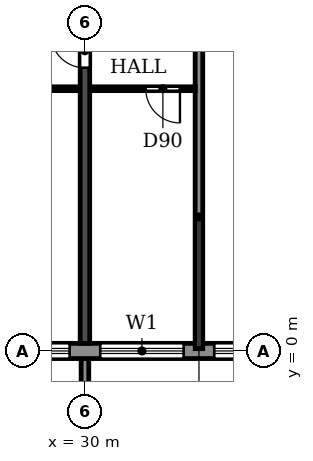
"""IFC4 building model, lengths in metres.
Left out: names, types, materials, properties, quantities, classifications, styles, units other than length and angle.
Written with IfcOpenShell. Run it as: python <this file> out.ifc"""

import sys

from ifc_helpers import new_model, si_unit, direction, frame, frame_2d, origin, place, context, subcontext, project, spatial, polyline, rectangle, outline, extrude, source, transform, mapped, element, fill, save


model = new_model("IFC4")
c1 = context("Model", 3, precision=1e-05, world=origin(), true_north=direction((0.0, 1.0)))
c2 = subcontext(c1, "Body", "Model", "MODEL_VIEW")
j1 = project(units=[si_unit("LENGTHUNIT", "METRE"), si_unit("PLANEANGLEUNIT", "RADIAN")], contexts=[c1])
p1 = place(None, origin())
s1 = spatial("IfcSite", under=j1, at=p1, CompositionType="ELEMENT")
p2 = place(p1, origin())
s2 = spatial("IfcBuilding", under=s1, at=p2, CompositionType="ELEMENT")
p3 = place(p2, frame((0.0, 0.0, 201.6)))
s3 = spatial("IfcBuildingStorey", under=s2, at=p3, CompositionType="ELEMENT", Elevation=201.6)
p4 = place(p3, frame((30.0, 0.2, 0.0), z_axis=(0.0, 0.0, 1.0), x_axis=(0.0, 1.0, 0.0)))
e1 = element("IfcWall", 1, at=p4, inside=s3, PredefinedType="SHEAR", context=c2, shape_type="SweptSolid", body=[
    extrude(rectangle(XDim=11.7, YDim=0.25, at=frame_2d((5.85, 0.0))), origin(), (0.0, 0.0, 1.0), 3.08),
])
p5 = place(p4, frame((7.25, 0.0, 0.0)))
e2 = element("IfcOpeningElement", 2, at=p5, cuts=e1, PredefinedType="OPENING", context=c2, shape_type="SweptSolid", body=[
    extrude(rectangle(XDim=0.9, YDim=2.1, at=frame_2d((0.45, 1.05))), frame((0.0, 0.135, 0.0), z_axis=(0.0, -1.0, 0.0), x_axis=(1.0, 0.0, 0.0)), (0.0, 0.0, 1.0), 0.27),
])
p6 = place(p3, frame((22.683, 0.0, 0.0), z_axis=(0.0, 0.0, 1.0), x_axis=(1.0, 0.0, 0.0)))
e3 = element("IfcWall", 3, at=p6, inside=s3, PredefinedType="STANDARD", context=c2, shape_type="SweptSolid", body=[
    extrude(rectangle(XDim=56.634, YDim=0.4, at=frame_2d((28.317, 0.0))), origin(), (0.0, 0.0, 1.0), 3.08),
])
p7 = place(p6, frame((1.917, 0.0, 0.0)))
e4 = element("IfcOpeningElement", 4, at=p7, cuts=e3, PredefinedType="OPENING", context=c2, shape_type="SweptSolid", body=[
    extrude(rectangle(XDim=1.8, YDim=2.4, at=frame_2d((0.9, 1.2))), frame((0.0, 0.21, 0.0), z_axis=(0.0, -1.0, 0.0), x_axis=(1.0, 0.0, 0.0)), (0.0, 0.0, 1.0), 0.42),
])
p8 = place(p6, frame((4.717, 0.0, 0.9)))
e5 = element("IfcOpeningElement", 5, at=p8, cuts=e3, PredefinedType="OPENING", context=c2, shape_type="SweptSolid", body=[
    extrude(rectangle(XDim=2.2, YDim=1.5, at=frame_2d((1.1, 0.75))), frame((0.0, 0.21, 0.0), z_axis=(0.0, -1.0, 0.0), x_axis=(1.0, 0.0, 0.0)), (0.0, 0.0, 1.0), 0.42),
])
p9 = place(p6, frame((7.717, 0.0, 0.9)))
e6 = element("IfcOpeningElement", 6, at=p9, cuts=e3, PredefinedType="OPENING", context=c2, shape_type="SweptSolid", body=[
    extrude(rectangle(XDim=2.2, YDim=1.5, at=frame_2d((1.1, 0.75))), frame((0.0, 0.21, 0.0), z_axis=(0.0, -1.0, 0.0), x_axis=(1.0, 0.0, 0.0)), (0.0, 0.0, 1.0), 0.42),
])
p10 = place(p6, frame((10.717, 0.0, 0.9)))
e7 = element("IfcOpeningElement", 7, at=p10, cuts=e3, PredefinedType="OPENING", context=c2, shape_type="SweptSolid", body=[
    extrude(rectangle(XDim=2.2, YDim=1.5, at=frame_2d((1.1, 0.75))), frame((0.0, 0.21, 0.0), z_axis=(0.0, -1.0, 0.0), x_axis=(1.0, 0.0, 0.0)), (0.0, 0.0, 1.0), 0.42),
])
p11 = place(p6, frame((13.917, 0.0, 0.0)))
e8 = element("IfcOpeningElement", 8, at=p11, cuts=e3, PredefinedType="OPENING", context=c2, shape_type="SweptSolid", body=[
    extrude(rectangle(XDim=1.8, YDim=2.4, at=frame_2d((0.9, 1.2))), frame((0.0, 0.21, 0.0), z_axis=(0.0, -1.0, 0.0), x_axis=(1.0, 0.0, 0.0)), (0.0, 0.0, 1.0), 0.42),
])
p12 = place(p6, frame((16.717, 0.0, 0.9)))
e9 = element("IfcOpeningElement", 9, at=p12, cuts=e3, PredefinedType="OPENING", context=c2, shape_type="SweptSolid", body=[
    extrude(rectangle(XDim=2.2, YDim=1.5, at=frame_2d((1.1, 0.75))), frame((0.0, 0.21, 0.0), z_axis=(0.0, -1.0, 0.0), x_axis=(1.0, 0.0, 0.0)), (0.0, 0.0, 1.0), 0.42),
])
p13 = place(p6, frame((19.717, 0.0, 0.9)))
e10 = element("IfcOpeningElement", 10, at=p13, cuts=e3, PredefinedType="OPENING", context=c2, shape_type="SweptSolid", body=[
    extrude(rectangle(XDim=2.2, YDim=1.5, at=frame_2d((1.1, 0.75))), frame((0.0, 0.21, 0.0), z_axis=(0.0, -1.0, 0.0), x_axis=(1.0, 0.0, 0.0)), (0.0, 0.0, 1.0), 0.42),
])
p14 = place(p6, frame((22.717, 0.0, 0.9)))
e11 = element("IfcOpeningElement", 11, at=p14, cuts=e3, PredefinedType="OPENING", context=c2, shape_type="SweptSolid", body=[
    extrude(rectangle(XDim=2.2, YDim=1.5, at=frame_2d((1.1, 0.75))), frame((0.0, 0.21, 0.0), z_axis=(0.0, -1.0, 0.0), x_axis=(1.0, 0.0, 0.0)), (0.0, 0.0, 1.0), 0.42),
])
p15 = place(p6, frame((25.917, 0.0, 0.0)))
e12 = element("IfcOpeningElement", 12, at=p15, cuts=e3, PredefinedType="OPENING", context=c2, shape_type="SweptSolid", body=[
    extrude(rectangle(XDim=1.8, YDim=2.4, at=frame_2d((0.9, 1.2))), frame((0.0, 0.21, 0.0), z_axis=(0.0, -1.0, 0.0), x_axis=(1.0, 0.0, 0.0)), (0.0, 0.0, 1.0), 0.42),
])
p16 = place(p6, frame((28.717, 0.0, 0.9)))
e13 = element("IfcOpeningElement", 13, at=p16, cuts=e3, PredefinedType="OPENING", context=c2, shape_type="SweptSolid", body=[
    extrude(rectangle(XDim=2.2, YDim=1.5, at=frame_2d((1.1, 0.75))), frame((0.0, 0.21, 0.0), z_axis=(0.0, -1.0, 0.0), x_axis=(1.0, 0.0, 0.0)), (0.0, 0.0, 1.0), 0.42),
])
p17 = place(p6, frame((31.717, 0.0, 0.9)))
e14 = element("IfcOpeningElement", 14, at=p17, cuts=e3, PredefinedType="OPENING", context=c2, shape_type="SweptSolid", body=[
    extrude(rectangle(XDim=2.2, YDim=1.5, at=frame_2d((1.1, 0.75))), frame((0.0, 0.21, 0.0), z_axis=(0.0, -1.0, 0.0), x_axis=(1.0, 0.0, 0.0)), (0.0, 0.0, 1.0), 0.42),
])
p18 = place(p6, frame((34.717, 0.0, 0.9)))
e15 = element("IfcOpeningElement", 15, at=p18, cuts=e3, PredefinedType="OPENING", context=c2, shape_type="SweptSolid", body=[
    extrude(rectangle(XDim=2.2, YDim=1.5, at=frame_2d((1.1, 0.75))), frame((0.0, 0.21, 0.0), z_axis=(0.0, -1.0, 0.0), x_axis=(1.0, 0.0, 0.0)), (0.0, 0.0, 1.0), 0.42),
])
p19 = place(p6, frame((37.717, 0.0, 0.9)))
e16 = element("IfcOpeningElement", 16, at=p19, cuts=e3, PredefinedType="OPENING", context=c2, shape_type="SweptSolid", body=[
    extrude(rectangle(XDim=2.2, YDim=1.5, at=frame_2d((1.1, 0.75))), frame((0.0, 0.21, 0.0), z_axis=(0.0, -1.0, 0.0), x_axis=(1.0, 0.0, 0.0)), (0.0, 0.0, 1.0), 0.42),
])
p20 = place(p6, frame((40.717, 0.0, 0.9)))
e17 = element("IfcOpeningElement", 17, at=p20, cuts=e3, PredefinedType="OPENING", context=c2, shape_type="SweptSolid", body=[
    extrude(rectangle(XDim=2.2, YDim=1.5, at=frame_2d((1.1, 0.75))), frame((0.0, 0.21, 0.0), z_axis=(0.0, -1.0, 0.0), x_axis=(1.0, 0.0, 0.0)), (0.0, 0.0, 1.0), 0.42),
])
p21 = place(p6, frame((43.717, 0.0, 0.9)))
e18 = element("IfcOpeningElement", 18, at=p21, cuts=e3, PredefinedType="OPENING", context=c2, shape_type="SweptSolid", body=[
    extrude(rectangle(XDim=2.2, YDim=1.5, at=frame_2d((1.1, 0.75))), frame((0.0, 0.21, 0.0), z_axis=(0.0, -1.0, 0.0), x_axis=(1.0, 0.0, 0.0)), (0.0, 0.0, 1.0), 0.42),
])
p22 = place(p6, frame((46.717, 0.0, 0.9)))
e19 = element("IfcOpeningElement", 19, at=p22, cuts=e3, PredefinedType="OPENING", context=c2, shape_type="SweptSolid", body=[
    extrude(rectangle(XDim=2.2, YDim=1.5, at=frame_2d((1.1, 0.75))), frame((0.0, 0.21, 0.0), z_axis=(0.0, -1.0, 0.0), x_axis=(1.0, 0.0, 0.0)), (0.0, 0.0, 1.0), 0.42),
])
p23 = place(p6, frame((49.717, 0.0, 0.9)))
e20 = element("IfcOpeningElement", 20, at=p23, cuts=e3, PredefinedType="OPENING", context=c2, shape_type="SweptSolid", body=[
    extrude(rectangle(XDim=2.2, YDim=1.5, at=frame_2d((1.1, 0.75))), frame((0.0, 0.21, 0.0), z_axis=(0.0, -1.0, 0.0), x_axis=(1.0, 0.0, 0.0)), (0.0, 0.0, 1.0), 0.42),
])
p24 = place(p6, frame((52.917, 0.0, 0.0)))
e21 = element("IfcOpeningElement", 21, at=p24, cuts=e3, PredefinedType="OPENING", context=c2, shape_type="SweptSolid", body=[
    extrude(rectangle(XDim=1.8, YDim=2.4, at=frame_2d((0.9, 1.2))), frame((0.0, 0.21, 0.0), z_axis=(0.0, -1.0, 0.0), x_axis=(1.0, 0.0, 0.0)), (0.0, 0.0, 1.0), 0.42),
])
m1 = source(origin(), c2, "Body", "SweptSolid", [
    extrude(outline(polyline([(0.0, 0.0), (0.2, 0.0), (0.2, 1.65), (0.0, 1.65), (0.0, 0.0)])), origin(), (0.0, 0.0, 1.0), 3.1),
])
p25 = place(p3, frame((29.9, -1.85, 0.0)))
e22 = element("IfcWall", 22, at=p25, inside=s3, PredefinedType="STANDARD", context=c2, shape_type="MappedRepresentation", body=[
    mapped(m1, transform((0.0, 0.0, 0.0))),
])
p26 = place(p3, frame((33.0, 0.06, 0.0), z_axis=(0.0, 0.0, 1.0), x_axis=(0.0, 1.0, 0.0)))
e23 = element("IfcWall", 23, at=p26, inside=s3, PredefinedType="PARTITIONING", context=c2, shape_type="SweptSolid", body=[
    extrude(rectangle(XDim=11.83, YDim=0.2, at=frame_2d((5.915, 0.0))), origin(), (0.0, 0.0, 1.0), 3.08),
])
p27 = place(p3, frame((26.95, 6.9, 0.0), z_axis=(0.0, 0.0, 1.0), x_axis=(1.0, 0.0, 0.0)))
e24 = element("IfcWall", 24, at=p27, inside=s3, PredefinedType="PARTITIONING", context=c2, shape_type="SweptSolid", body=[
    extrude(rectangle(XDim=2.915, YDim=0.1, at=frame_2d((1.458, 0.0))), origin(), (0.0, 0.0, 1.0), 3.08),
])
p28 = place(p27, frame((0.55, 0.0, 0.0)))
e25 = element("IfcOpeningElement", 25, at=p28, cuts=e24, PredefinedType="OPENING", context=c2, shape_type="SweptSolid", body=[
    extrude(rectangle(XDim=0.9, YDim=2.1, at=frame_2d((0.45, 1.05))), frame((0.0, 0.06, 0.0), z_axis=(0.0, -1.0, 0.0), x_axis=(1.0, 0.0, 0.0)), (0.0, 0.0, 1.0), 0.12),
])
p29 = place(p3, frame((30.135, 6.9, 0.0), z_axis=(0.0, 0.0, 1.0), x_axis=(1.0, 0.0, 0.0)))
e26 = element("IfcWall", 26, at=p29, inside=s3, PredefinedType="PARTITIONING", context=c2, shape_type="SweptSolid", body=[
    extrude(rectangle(XDim=2.765, YDim=0.1, at=frame_2d((1.382, 0.0))), origin(), (0.0, 0.0, 1.0), 3.08),
])
p30 = place(p29, frame((1.465, 0.0, 0.0)))
e27 = element("IfcOpeningElement", 27, at=p30, cuts=e26, PredefinedType="OPENING", context=c2, shape_type="SweptSolid", body=[
    extrude(rectangle(XDim=0.9, YDim=2.1, at=frame_2d((0.45, 1.05))), frame((0.0, 0.06, 0.0), z_axis=(0.0, -1.0, 0.0), x_axis=(1.0, 0.0, 0.0)), (0.0, 0.0, 1.0), 0.12),
])
p31 = place(p8, origin())
e28 = element("IfcWindow", 28, at=p31, inside=s3, PartitioningType="DOUBLE_PANEL_HORIZONTAL", PredefinedType="WINDOW", context=c2, shape_type="SweptSolid", body=[
    extrude(rectangle(XDim=2.2, YDim=1.5, at=frame_2d((1.1, 0.75))), frame((0.0, 0.03, 0.0), z_axis=(0.0, -1.0, 0.0), x_axis=(1.0, 0.0, 0.0)), (0.0, 0.0, 1.0), 0.06),
])
fill(e5, e28)
p32 = place(p9, origin())
e29 = element("IfcWindow", 29, at=p32, inside=s3, PartitioningType="DOUBLE_PANEL_HORIZONTAL", PredefinedType="WINDOW", context=c2, shape_type="SweptSolid", body=[
    extrude(rectangle(XDim=2.2, YDim=1.5, at=frame_2d((1.1, 0.75))), frame((0.0, 0.03, 0.0), z_axis=(0.0, -1.0, 0.0), x_axis=(1.0, 0.0, 0.0)), (0.0, 0.0, 1.0), 0.06),
])
fill(e6, e29)
p33 = place(p10, origin())
e30 = element("IfcWindow", 30, at=p33, inside=s3, PartitioningType="DOUBLE_PANEL_HORIZONTAL", PredefinedType="WINDOW", context=c2, shape_type="SweptSolid", body=[
    extrude(rectangle(XDim=2.2, YDim=1.5, at=frame_2d((1.1, 0.75))), frame((0.0, 0.03, 0.0), z_axis=(0.0, -1.0, 0.0), x_axis=(1.0, 0.0, 0.0)), (0.0, 0.0, 1.0), 0.06),
])
fill(e7, e30)
p34 = place(p30, frame((0.9, 0.0, 0.0), z_axis=(0.0, 0.0, 1.0), x_axis=(-1.0, 0.0, 0.0)))
e31 = element("IfcDoor", 31, at=p34, inside=s3, OperationType="SINGLE_SWING_LEFT", PredefinedType="DOOR", context=c2, shape_type="SweptSolid", body=[
    extrude(rectangle(XDim=0.9, YDim=2.1, at=frame_2d((0.45, 1.05))), frame((0.0, 0.025, 0.0), z_axis=(0.0, -1.0, 0.0), x_axis=(1.0, 0.0, 0.0)), (0.0, 0.0, 1.0), 0.05),
])
fill(e27, e31)
p35 = place(p5, origin())
e32 = element("IfcDoor", 32, at=p35, inside=s3, OperationType="SINGLE_SWING_RIGHT", PredefinedType="DOOR", context=c2, shape_type="SweptSolid", body=[
    extrude(rectangle(XDim=0.9, YDim=2.1, at=frame_2d((0.45, 1.05))), frame((0.0, 0.025, 0.0), z_axis=(0.0, -1.0, 0.0), x_axis=(1.0, 0.0, 0.0)), (0.0, 0.0, 1.0), 0.05),
])
fill(e2, e32)
save(model, sys.argv[1])
